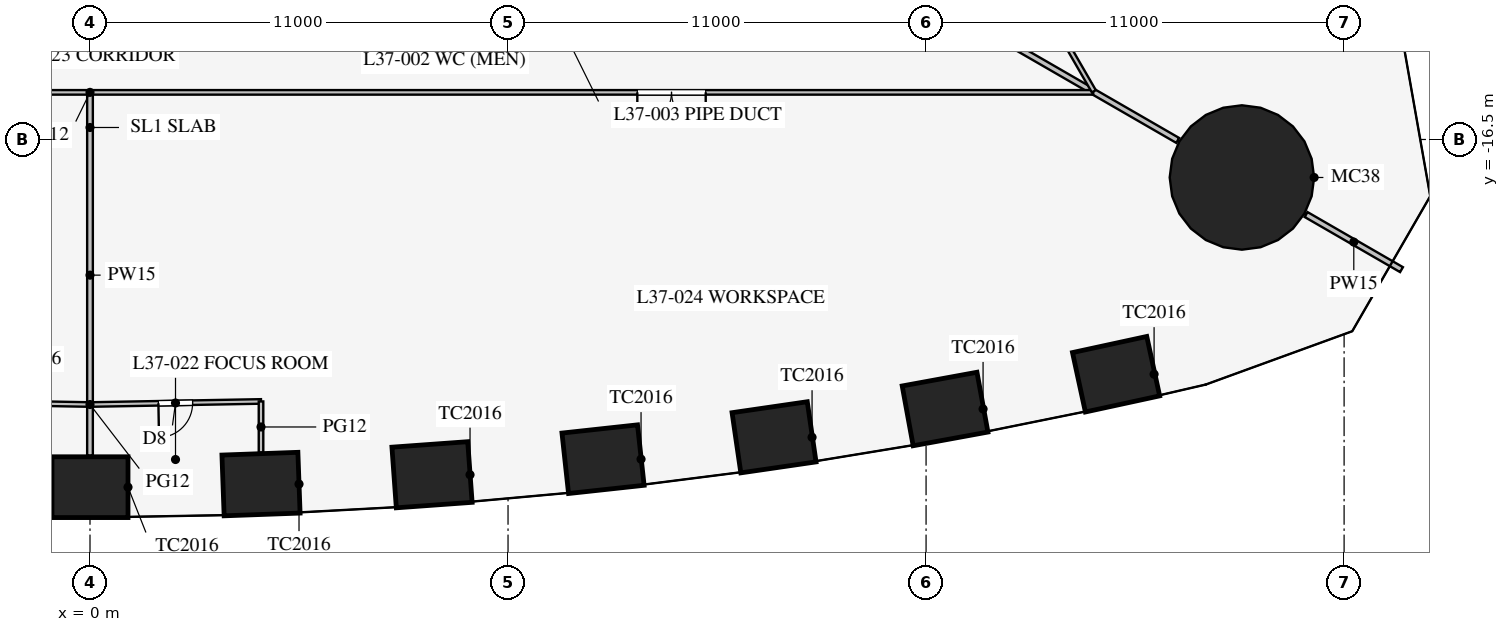
"""IFC4 building model, lengths in metres.
Left out: names, types, materials, properties, quantities, classifications, styles, units other than length and angle.
Written with IfcOpenShell. Run it as: python <this file> out.ifc"""

import sys

from ifc_helpers import new_model, si_unit, direction, frame, frame_2d, origin, origin_2d, place, context, subcontext, project, spatial, rectangle, circle, extrude, element, fill, save


model = new_model("IFC4")
c1 = context("Model", 3, precision=1e-05, world=origin(), true_north=direction((0.0, 1.0)))
c2 = subcontext(c1, "Body", "Model", "MODEL_VIEW")
j1 = project(units=[si_unit("LENGTHUNIT", "METRE"), si_unit("PLANEANGLEUNIT", "RADIAN")], contexts=[c1])
p1 = place(None, origin())
s1 = spatial("IfcSite", under=j1, at=p1, CompositionType="ELEMENT")
p2 = place(p1, origin())
s2 = spatial("IfcBuilding", under=s1, at=p2, CompositionType="ELEMENT")
p3 = place(p2, frame((0.0, 0.0, 161.9)))
s3 = spatial("IfcBuildingStorey", under=s2, at=p3, CompositionType="ELEMENT", Elevation=161.9)
for number, where, z_axis, x_axis in (
    (1, (0.0, -25.65, 0.0), (0.0, 0.0, 1.0), (1.0, 0.0, 0.0)),
    (2, (4.5, -25.568, 0.0), (0.0, 0.0, 1.0), (0.999, 0.036, 0.0)),
    (3, (9.0, -25.323, 0.0), (0.0, 0.0, 1.0), (0.997, 0.072, 0.0)),
    (4, (13.5, -24.913, 0.0), (0.0, 0.0, 1.0), (0.994, 0.108, 0.0)),
    (5, (18.0, -24.337, 0.0), (0.0, 0.0, 1.0), (0.99, 0.144, 0.0)),
    (6, (22.5, -23.593, 0.0), (0.0, 0.0, 1.0), (0.984, 0.18, 0.0)),
    (7, (27.0, -22.677, 0.0), (0.0, 0.0, 1.0), (0.977, 0.212, 0.0)),
):
    element("IfcColumn", number, at=place(p3, frame(where, z_axis=z_axis, x_axis=x_axis)), inside=s3, PredefinedType="COLUMN", context=c2, shape_type="SweptSolid", body=[
        extrude(rectangle(XDim=2.0, YDim=1.6, at=origin_2d()), origin(), (0.0, 0.0, 1.0), 4.2),
    ])
p4 = place(p3, frame((30.311, -17.5, 0.0), z_axis=(0.0, 0.0, 1.0), x_axis=(1.0, 0.0, 0.0)))
e8 = element("IfcColumn", 8, at=p4, inside=s3, PredefinedType="COLUMN", context=c2, shape_type="SweptSolid", body=[
    extrude(circle(Radius=1.9, at=origin_2d()), origin(), (0.0, 0.0, 1.0), 4.2),
])
p5 = place(p3, frame((14.203, -8.2, 0.0), z_axis=(0.0, 0.0, 1.0), x_axis=(0.866024668836, -0.500001272966, 0.0)))
e9 = element("IfcWall", 9, at=p5, inside=s3, PredefinedType="PARTITIONING", context=c2, shape_type="SweptSolid", body=[
    extrude(rectangle(XDim=16.65, YDim=0.15, at=frame_2d((8.325, 0.0))), origin(), (0.0, 0.0, 1.0), 2.3),
])
p6 = place(p3, frame((32.0, -18.475, 0.0), z_axis=(0.0, 0.0, 1.0), x_axis=(0.866042548026, -0.499970304126, 0.0)))
e10 = element("IfcWall", 10, at=p6, inside=s3, PredefinedType="PARTITIONING", context=c2, shape_type="SweptSolid", body=[
    extrude(rectangle(XDim=2.899, YDim=0.15, at=frame_2d((1.45, 0.0))), origin(), (0.0, 0.0, 1.0), 2.3),
])
p7 = place(p3, frame((0.0, -15.32, 0.0), z_axis=(0.0, 0.0, 1.0), x_axis=(0.0, -1.0, 0.0)))
e11 = element("IfcWall", 11, at=p7, inside=s3, PredefinedType="PARTITIONING", context=c2, shape_type="SweptSolid", body=[
    extrude(rectangle(XDim=9.5, YDim=0.15, at=frame_2d((4.75, 0.0))), origin(), (0.0, 0.0, 1.0), 2.8),
])
p8 = place(p3, frame((-26.398, -15.26, 0.0), z_axis=(0.0, 0.0, 1.0), x_axis=(1.0, 0.0, 0.0)))
e12 = element("IfcWall", 12, at=p8, inside=s3, PredefinedType="PARTITIONING", context=c2, shape_type="SweptSolid", body=[
    extrude(rectangle(XDim=52.796, YDim=0.12, at=frame_2d((26.398, 0.0))), origin(), (0.0, 0.0, 1.0), 2.9),
])
p9 = place(p8, frame((10.2, 0.0, 0.15)))
e13 = element("IfcOpeningElement", 13, at=p9, cuts=e12, PredefinedType="OPENING", context=c2, shape_type="SweptSolid", body=[
    extrude(rectangle(XDim=1.8, YDim=2.1, at=frame_2d((0.9, 1.05))), frame((0.0, 0.07, 0.0), z_axis=(0.0, -1.0, 0.0), x_axis=(1.0, 0.0, 0.0)), (0.0, 0.0, 1.0), 0.14),
])
p10 = place(p8, frame((40.8, 0.0, 0.15)))
e14 = element("IfcOpeningElement", 14, at=p10, cuts=e12, PredefinedType="OPENING", context=c2, shape_type="SweptSolid", body=[
    extrude(rectangle(XDim=1.8, YDim=2.1, at=frame_2d((0.9, 1.05))), frame((0.0, 0.07, 0.0), z_axis=(0.0, -1.0, 0.0), x_axis=(1.0, 0.0, 0.0)), (0.0, 0.0, 1.0), 0.14),
])
p11 = place(p3, frame((0.0, -23.475, 0.0), z_axis=(0.0, 0.0, 1.0), x_axis=(0.999837820638, 0.018009231578, 0.0)))
e15 = element("IfcWall", 15, at=p11, inside=s3, PredefinedType="PARTITIONING", context=c2, shape_type="SweptSolid", body=[
    extrude(rectangle(XDim=4.501, YDim=0.12, at=frame_2d((2.25, 0.0))), origin(), (0.0, 0.0, 1.0), 2.9),
])
p12 = place(p11, frame((1.8, 0.0, 0.15)))
e16 = element("IfcOpeningElement", 16, at=p12, cuts=e15, PredefinedType="OPENING", context=c2, shape_type="SweptSolid", body=[
    extrude(rectangle(XDim=0.9, YDim=2.1, at=frame_2d((0.45, 1.05))), frame((0.0, 0.07, 0.0), z_axis=(0.0, -1.0, 0.0), x_axis=(1.0, 0.0, 0.0)), (0.0, 0.0, 1.0), 0.14),
])
p13 = place(p3, frame((-4.5, -23.394, 0.0), z_axis=(0.0, 0.0, 1.0), x_axis=(0.999837820638, -0.018009231578, 0.0)))
e17 = element("IfcWall", 17, at=p13, inside=s3, PredefinedType="PARTITIONING", context=c2, shape_type="SweptSolid", body=[
    extrude(rectangle(XDim=4.501, YDim=0.12, at=frame_2d((2.25, 0.0))), origin(), (0.0, 0.0, 1.0), 2.9),
])
p14 = place(p13, frame((1.8, 0.0, 0.15)))
e18 = element("IfcOpeningElement", 18, at=p14, cuts=e17, PredefinedType="OPENING", context=c2, shape_type="SweptSolid", body=[
    extrude(rectangle(XDim=0.9, YDim=2.1, at=frame_2d((0.45, 1.05))), frame((0.0, 0.07, 0.0), z_axis=(0.0, -1.0, 0.0), x_axis=(1.0, 0.0, 0.0)), (0.0, 0.0, 1.0), 0.14),
])
p15 = place(p3, frame((4.5, -23.394, 0.0), z_axis=(0.0, 0.0, 1.0), x_axis=(0.0, -1.0, 0.0)))
e19 = element("IfcWall", 19, at=p15, inside=s3, PredefinedType="PARTITIONING", context=c2, shape_type="SweptSolid", body=[
    extrude(rectangle(XDim=1.344, YDim=0.12, at=frame_2d((0.672, 0.0))), origin(), (0.0, 0.0, 1.0), 2.8),
])
p16 = place(p3, frame((26.415, -15.231, 0.0), z_axis=(0.0, 0.0, 1.0), x_axis=(-0.50000091641, 0.866024874695, 0.0)))
e20 = element("IfcWall", 20, at=p16, inside=s3, PredefinedType="PARTITIONING", context=c2, shape_type="SweptSolid", body=[
    extrude(rectangle(XDim=52.796, YDim=0.12, at=frame_2d((26.398, 0.0))), origin(), (0.0, 0.0, 1.0), 2.9),
])
p17 = place(p16, frame((10.2, 0.0, 0.15)))
e21 = element("IfcOpeningElement", 21, at=p17, cuts=e20, PredefinedType="OPENING", context=c2, shape_type="SweptSolid", body=[
    extrude(rectangle(XDim=1.8, YDim=2.1, at=frame_2d((0.9, 1.05))), frame((0.0, 0.07, 0.0), z_axis=(0.0, -1.0, 0.0), x_axis=(1.0, 0.0, 0.0)), (0.0, 0.0, 1.0), 0.14),
])
p18 = place(p16, frame((40.8, 0.0, 0.15)))
e22 = element("IfcOpeningElement", 22, at=p18, cuts=e20, PredefinedType="OPENING", context=c2, shape_type="SweptSolid", body=[
    extrude(rectangle(XDim=1.8, YDim=2.1, at=frame_2d((0.9, 1.05))), frame((0.0, 0.07, 0.0), z_axis=(0.0, -1.0, 0.0), x_axis=(1.0, 0.0, 0.0)), (0.0, 0.0, 1.0), 0.14),
])
p19 = place(p3, frame((-0.016, 30.491, 0.0), z_axis=(0.0, 0.0, 1.0), x_axis=(-0.50000091641, -0.866024874695, 0.0)))
e23 = element("IfcWall", 23, at=p19, inside=s3, PredefinedType="PARTITIONING", context=c2, shape_type="SweptSolid", body=[
    extrude(rectangle(XDim=52.796, YDim=0.12, at=frame_2d((26.398, 0.0))), origin(), (0.0, 0.0, 1.0), 2.9),
])
p20 = place(p19, frame((10.2, 0.0, 0.15)))
e24 = element("IfcOpeningElement", 24, at=p20, cuts=e23, PredefinedType="OPENING", context=c2, shape_type="SweptSolid", body=[
    extrude(rectangle(XDim=1.8, YDim=2.1, at=frame_2d((0.9, 1.05))), frame((0.0, 0.07, 0.0), z_axis=(0.0, -1.0, 0.0), x_axis=(1.0, 0.0, 0.0)), (0.0, 0.0, 1.0), 0.14),
])
p21 = place(p19, frame((40.8, 0.0, 0.15)))
e25 = element("IfcOpeningElement", 25, at=p21, cuts=e23, PredefinedType="OPENING", context=c2, shape_type="SweptSolid", body=[
    extrude(rectangle(XDim=1.8, YDim=2.1, at=frame_2d((0.9, 1.05))), frame((0.0, 0.07, 0.0), z_axis=(0.0, -1.0, 0.0), x_axis=(1.0, 0.0, 0.0)), (0.0, 0.0, 1.0), 0.14),
])
p22 = place(p12, frame((0.9, 0.0, 0.0), z_axis=(0.0, 0.0, 1.0), x_axis=(-1.0, 0.0, 0.0)))
e26 = element("IfcDoor", 26, at=p22, inside=s3, OperationType="SINGLE_SWING_RIGHT", PredefinedType="DOOR", context=c2, shape_type="SweptSolid", body=[
    extrude(rectangle(XDim=0.9, YDim=2.1, at=frame_2d((0.45, 1.05))), frame((0.0, 0.025, 0.0), z_axis=(0.0, -1.0, 0.0), x_axis=(1.0, 0.0, 0.0)), (0.0, 0.0, 1.0), 0.05),
])
fill(e16, e26)
p23 = place(p10, frame((1.8, 0.0, 0.0), z_axis=(0.0, 0.0, 1.0), x_axis=(-1.0, 0.0, 0.0)))
e27 = element("IfcDoor", 27, at=p23, inside=s3, OperationType="DOUBLE_DOOR_SINGLE_SWING", PredefinedType="DOOR", context=c2, shape_type="SweptSolid", body=[
    extrude(rectangle(XDim=1.8, YDim=2.1, at=frame_2d((0.9, 1.05))), frame((0.0, 0.025, 0.0), z_axis=(0.0, -1.0, 0.0), x_axis=(1.0, 0.0, 0.0)), (0.0, 0.0, 1.0), 0.05),
])
fill(e14, e27)
save(model, sys.argv[1])
